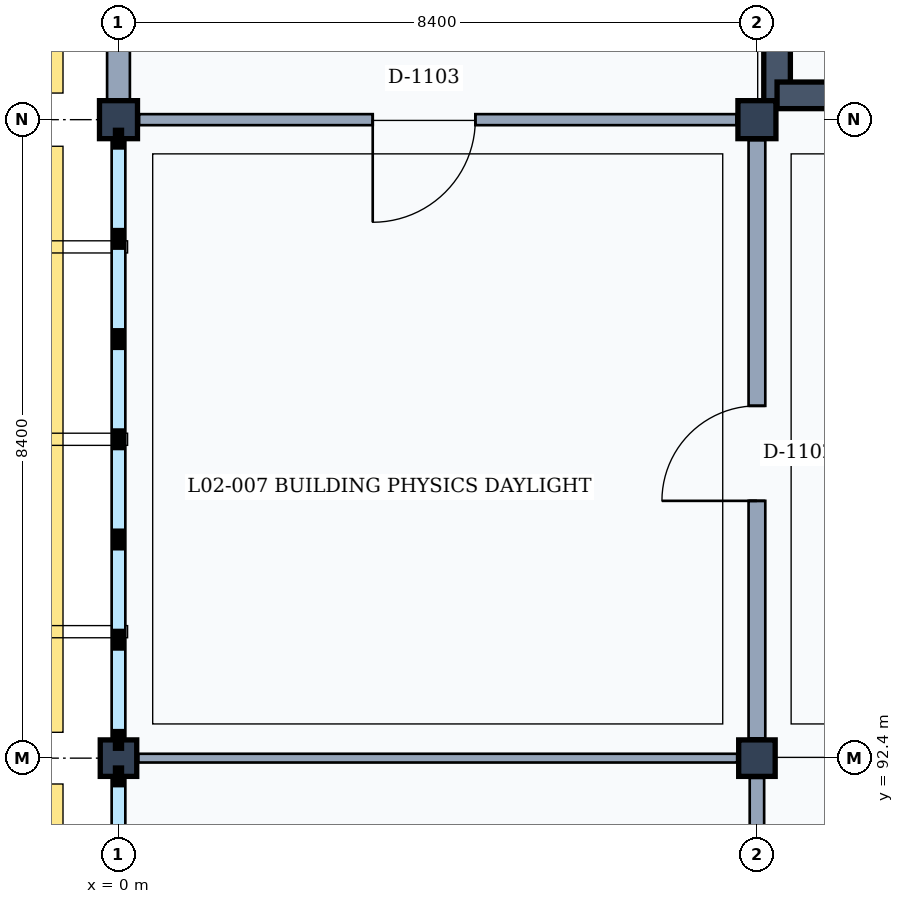
"""IFC4 building model, lengths in metres.
Left out: names, types, materials, properties, quantities, classifications, styles, units other than length and angle.
Written with IfcOpenShell. Run it as: python <this file> out.ifc"""

import sys

from ifc_helpers import new_model, si_unit, direction, frame, frame_2d, origin, origin_2d, place, context, subcontext, project, spatial, rectangle, extrude, element, fill, save


model = new_model("IFC4")
c1 = context("Model", 3, precision=1e-05, world=origin(), true_north=direction((0.0, 1.0)))
c2 = subcontext(c1, "Body", "Model", "MODEL_VIEW")
j1 = project(units=[si_unit("LENGTHUNIT", "METRE"), si_unit("PLANEANGLEUNIT", "RADIAN")], contexts=[c1])
p1 = place(None, origin())
s1 = spatial("IfcSite", under=j1, at=p1, CompositionType="ELEMENT")
p2 = place(p1, origin())
s2 = spatial("IfcBuilding", under=s1, at=p2, CompositionType="ELEMENT")
p3 = place(p2, frame((0.0, 0.0, 9.6)))
s3 = spatial("IfcBuildingStorey", under=s2, at=p3, CompositionType="ELEMENT", Elevation=9.6)
p4 = place(p3, frame((0.0, 92.4, 0.0), z_axis=(0.0, 0.0, 1.0), x_axis=(1.0, 0.0, 0.0)))
e1 = element("IfcColumn", 1, at=p4, inside=s3, PredefinedType="COLUMN", context=c2, shape_type="SweptSolid", body=[
    extrude(rectangle(XDim=0.48, YDim=0.48, at=origin_2d()), origin(), (0.0, 0.0, 1.0), 4.2),
])
p5 = place(p3, frame((0.0, 100.8, 0.0), z_axis=(0.0, 0.0, 1.0), x_axis=(1.0, 0.0, 0.0)))
e2 = element("IfcColumn", 2, at=p5, inside=s3, PredefinedType="COLUMN", context=c2, shape_type="SweptSolid", body=[
    extrude(rectangle(XDim=0.5, YDim=0.5, at=origin_2d()), origin(), (0.0, 0.0, 1.0), 4.2),
])
p6 = place(p3, frame((8.4, 92.4, 0.0), z_axis=(0.0, 0.0, 1.0), x_axis=(1.0, 0.0, 0.0)))
e3 = element("IfcColumn", 3, at=p6, inside=s3, PredefinedType="COLUMN", context=c2, shape_type="SweptSolid", body=[
    extrude(rectangle(XDim=0.48, YDim=0.48, at=origin_2d()), origin(), (0.0, 0.0, 1.0), 4.2),
])
p7 = place(p3, frame((8.4, 100.8, 0.0), z_axis=(0.0, 0.0, 1.0), x_axis=(1.0, 0.0, 0.0)))
e4 = element("IfcColumn", 4, at=p7, inside=s3, PredefinedType="COLUMN", context=c2, shape_type="SweptSolid", body=[
    extrude(rectangle(XDim=0.5, YDim=0.5, at=origin_2d()), origin(), (0.0, 0.0, 1.0), 4.2),
])
p8 = place(p3, frame((0.0, 101.05, 0.0), z_axis=(0.0, 0.0, 1.0), x_axis=(0.0, 1.0, 0.0)))
e5 = element("IfcWall", 5, at=p8, inside=s3, PredefinedType="SOLIDWALL", context=c2, shape_type="SweptSolid", body=[
    extrude(rectangle(XDim=7.91, YDim=0.3, at=frame_2d((3.955, 0.0))), origin(), (0.0, 0.0, 1.0), 3.36),
])
p9 = place(p8, frame((3.23, 0.0, 0.9)))
e6 = element("IfcOpeningElement", 6, at=p9, cuts=e5, PredefinedType="OPENING", context=c2, shape_type="SweptSolid", body=[
    extrude(rectangle(XDim=1.45, YDim=1.8, at=frame_2d((0.725, 0.9))), frame((0.0, 0.16, 0.0), z_axis=(0.0, -1.0, 0.0), x_axis=(1.0, 0.0, 0.0)), (0.0, 0.0, 1.0), 0.32),
])
p10 = place(p3, frame((8.665, 101.05, 0.0), z_axis=(0.0, 0.0, 1.0), x_axis=(0.0, 1.0, 0.0)))
e7 = element("IfcWall", 7, at=p10, inside=s3, PredefinedType="SHEAR", context=c2, shape_type="SweptSolid", body=[
    extrude(rectangle(XDim=7.94, YDim=0.35, at=frame_2d((3.97, 0.0))), origin(), (0.0, 0.0, 1.0), 3.96),
])
p11 = place(p3, frame((16.54, 101.12, 0.0), z_axis=(0.0, 0.0, 1.0), x_axis=(-1.0, 0.0, 0.0)))
e8 = element("IfcWall", 8, at=p11, inside=s3, PredefinedType="SHEAR", context=c2, shape_type="SweptSolid", body=[
    extrude(rectangle(XDim=7.875, YDim=0.35, at=frame_2d((3.938, 0.0))), origin(), (0.0, 0.0, 1.0), 3.96),
])
p12 = place(p3, frame((8.4, 84.27, 0.0), z_axis=(0.0, 0.0, 1.0), x_axis=(0.0, 1.0, 0.0)))
e9 = element("IfcWall", 9, at=p12, inside=s3, PredefinedType="PARTITIONING", context=c2, shape_type="SweptSolid", body=[
    extrude(rectangle(XDim=7.87, YDim=0.19, at=frame_2d((3.935, 0.0))), origin(), (0.0, 0.0, 1.0), 3.32),
])
p13 = place(p12, frame((3.3, 0.0, 0.0)))
e10 = element("IfcOpeningElement", 10, at=p13, cuts=e9, PredefinedType="OPENING", context=c2, shape_type="SweptSolid", body=[
    extrude(rectangle(XDim=0.9, YDim=2.1, at=frame_2d((0.45, 1.05))), frame((0.0, 0.105, 0.0), z_axis=(0.0, -1.0, 0.0), x_axis=(1.0, 0.0, 0.0)), (0.0, 0.0, 1.0), 0.21),
])
p14 = place(p3, frame((0.26, 92.4, 0.0), z_axis=(0.0, 0.0, 1.0), x_axis=(1.0, 0.0, 0.0)))
e11 = element("IfcWall", 11, at=p14, inside=s3, PredefinedType="PARTITIONING", context=c2, shape_type="SweptSolid", body=[
    extrude(rectangle(XDim=7.88, YDim=0.115, at=frame_2d((3.94, 0.0))), origin(), (0.0, 0.0, 1.0), 3.32),
])
p15 = place(p3, frame((8.4, 92.66, 0.0), z_axis=(0.0, 0.0, 1.0), x_axis=(0.0, 1.0, 0.0)))
e12 = element("IfcWall", 12, at=p15, inside=s3, PredefinedType="PARTITIONING", context=c2, shape_type="SweptSolid", body=[
    extrude(rectangle(XDim=7.87, YDim=0.22, at=frame_2d((3.935, 0.0))), origin(), (0.0, 0.0, 1.0), 3.32),
])
p16 = place(p15, frame((3.125, 0.0, 0.0)))
e13 = element("IfcOpeningElement", 13, at=p16, cuts=e12, PredefinedType="OPENING", context=c2, shape_type="SweptSolid", body=[
    extrude(rectangle(XDim=1.25, YDim=2.3, at=frame_2d((0.625, 1.15))), frame((0.0, 0.12, 0.0), z_axis=(0.0, -1.0, 0.0), x_axis=(1.0, 0.0, 0.0)), (0.0, 0.0, 1.0), 0.24),
])
p17 = place(p3, frame((0.27, 100.8, 0.0), z_axis=(0.0, 0.0, 1.0), x_axis=(1.0, 0.0, 0.0)))
e14 = element("IfcWall", 14, at=p17, inside=s3, PredefinedType="PARTITIONING", context=c2, shape_type="SweptSolid", body=[
    extrude(rectangle(XDim=7.86, YDim=0.145, at=frame_2d((3.93, 0.0))), origin(), (0.0, 0.0, 1.0), 3.32),
])
p18 = place(p17, frame((3.075, 0.0, 0.0)))
e15 = element("IfcOpeningElement", 15, at=p18, cuts=e14, PredefinedType="OPENING", context=c2, shape_type="SweptSolid", body=[
    extrude(rectangle(XDim=1.35, YDim=2.25, at=frame_2d((0.675, 1.125))), frame((0.0, 0.083, 0.0), z_axis=(0.0, -1.0, 0.0), x_axis=(1.0, 0.0, 0.0)), (0.0, 0.0, 1.0), 0.165),
])
p19 = place(p16, origin())
e16 = element("IfcDoor", 16, at=p19, inside=s3, OperationType="SINGLE_SWING_LEFT", PredefinedType="DOOR", context=c2, shape_type="SweptSolid", body=[
    extrude(rectangle(XDim=1.25, YDim=2.3, at=frame_2d((0.625, 1.15))), frame((0.0, 0.025, 0.0), z_axis=(0.0, -1.0, 0.0), x_axis=(1.0, 0.0, 0.0)), (0.0, 0.0, 1.0), 0.05),
])
fill(e13, e16)
p20 = place(p18, frame((1.35, 0.0, 0.0), z_axis=(0.0, 0.0, 1.0), x_axis=(-1.0, 0.0, 0.0)))
e17 = element("IfcDoor", 17, at=p20, inside=s3, OperationType="SINGLE_SWING_RIGHT", PredefinedType="DOOR", context=c2, shape_type="SweptSolid", body=[
    extrude(rectangle(XDim=1.35, YDim=2.25, at=frame_2d((0.675, 1.125))), frame((0.0, 0.025, 0.0), z_axis=(0.0, -1.0, 0.0), x_axis=(1.0, 0.0, 0.0)), (0.0, 0.0, 1.0), 0.05),
])
fill(e15, e17)
save(model, sys.argv[1])
